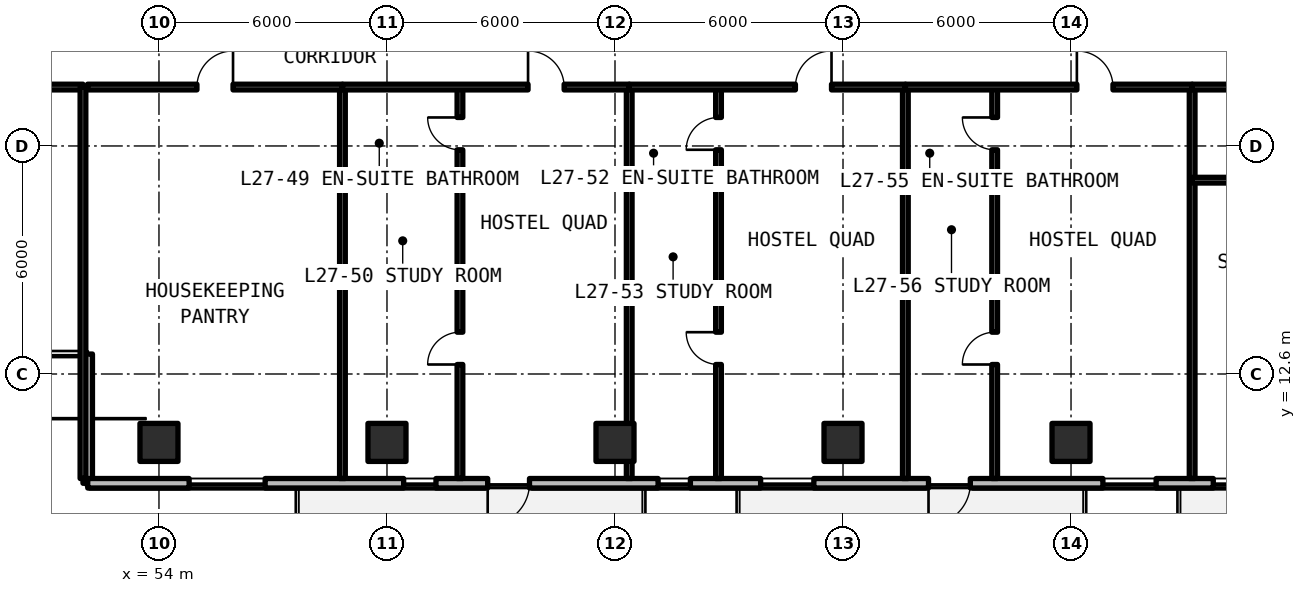
"""IFC4 building model, lengths in metres.
Left out: names, types, materials, properties, quantities, classifications, styles, units other than length and angle.
Written with IfcOpenShell. Run it as: python <this file> out.ifc"""

import sys

from ifc_helpers import new_model, si_unit, direction, frame, frame_2d, origin, origin_2d, place, context, subcontext, project, spatial, rectangle, extrude, element, fill, save


model = new_model("IFC4")
c1 = context("Model", 3, precision=1e-05, world=origin(), true_north=direction((0.0, 1.0)))
c2 = subcontext(c1, "Body", "Model", "MODEL_VIEW")
j1 = project(units=[si_unit("LENGTHUNIT", "METRE"), si_unit("PLANEANGLEUNIT", "RADIAN")], contexts=[c1])
p1 = place(None, origin())
s1 = spatial("IfcSite", under=j1, at=p1, CompositionType="ELEMENT")
p2 = place(p1, origin())
s2 = spatial("IfcBuilding", under=s1, at=p2, CompositionType="ELEMENT")
p3 = place(p2, frame((0.0, 0.0, 98.67)))
s3 = spatial("IfcBuildingStorey", under=s2, at=p3, CompositionType="ELEMENT", Elevation=98.67)
for number, where, z_axis, x_axis in (
    (1, (54.0, 10.8, 0.0), (0.0, 0.0, 1.0), (1.0, 0.0, 0.0)),
    (2, (60.0, 10.8, 0.0), (0.0, 0.0, 1.0), (1.0, 0.0, 0.0)),
    (3, (66.0, 10.8, 0.0), (0.0, 0.0, 1.0), (1.0, 0.0, 0.0)),
    (4, (72.0, 10.8, 0.0), (0.0, 0.0, 1.0), (1.0, 0.0, 0.0)),
    (5, (78.0, 10.8, 0.0), (0.0, 0.0, 1.0), (1.0, 0.0, 0.0)),
):
    element("IfcColumn", number, at=place(p3, frame(where, z_axis=z_axis, x_axis=x_axis)), inside=s3, PredefinedType="COLUMN", context=c2, shape_type="SweptSolid", body=[
        extrude(rectangle(XDim=1.0, YDim=1.0, at=origin_2d()), origin(), (0.0, 0.0, 1.0), 3.3),
    ])
p4 = place(p3, frame((52.125, 13.125, 0.0), z_axis=(0.0, 0.0, 1.0), x_axis=(0.0, -1.0, 0.0)))
e6 = element("IfcWall", 6, at=p4, inside=s3, PredefinedType="SOLIDWALL", context=c2, shape_type="SweptSolid", body=[
    extrude(rectangle(XDim=3.4, YDim=0.25, at=frame_2d((1.7, 0.0))), origin(), (0.0, 0.0, 1.0), 3.08),
])
p5 = place(p3, frame((52.125, 9.725, 0.0), z_axis=(0.0, 0.0, 1.0), x_axis=(1.0, 0.0, 0.0)))
e7 = element("IfcWall", 7, at=p5, inside=s3, PredefinedType="SOLIDWALL", context=c2, shape_type="SweptSolid", body=[
    extrude(rectangle(XDim=44.023, YDim=0.25, at=frame_2d((22.012, 0.0))), origin(), (0.0, 0.0, 1.0), 3.08),
])
p6 = place(p5, frame((10.525, 0.0, 0.0)))
e8 = element("IfcOpeningElement", 8, at=p6, cuts=e7, PredefinedType="OPENING", context=c2, shape_type="SweptSolid", body=[
    extrude(rectangle(XDim=1.1, YDim=2.15, at=frame_2d((0.55, 1.075))), frame((0.0, 0.135, 0.0), z_axis=(0.0, -1.0, 0.0), x_axis=(1.0, 0.0, 0.0)), (0.0, 0.0, 1.0), 0.27),
])
p7 = place(p5, frame((22.125, 0.0, 0.0)))
e9 = element("IfcOpeningElement", 9, at=p7, cuts=e7, PredefinedType="OPENING", context=c2, shape_type="SweptSolid", body=[
    extrude(rectangle(XDim=1.1, YDim=2.15, at=frame_2d((0.55, 1.075))), frame((0.0, 0.135, 0.0), z_axis=(0.0, -1.0, 0.0), x_axis=(1.0, 0.0, 0.0)), (0.0, 0.0, 1.0), 0.27),
])
p8 = place(p5, frame((34.475, 0.0, 0.0)))
e10 = element("IfcOpeningElement", 10, at=p8, cuts=e7, PredefinedType="OPENING", context=c2, shape_type="SweptSolid", body=[
    extrude(rectangle(XDim=1.1, YDim=2.15, at=frame_2d((0.55, 1.075))), frame((0.0, 0.135, 0.0), z_axis=(0.0, -1.0, 0.0), x_axis=(1.0, 0.0, 0.0)), (0.0, 0.0, 1.0), 0.27),
])
p9 = place(p5, frame((2.669, 0.0, 0.78)))
e11 = element("IfcOpeningElement", 11, at=p9, cuts=e7, PredefinedType="OPENING", context=c2, shape_type="SweptSolid", body=[
    extrude(rectangle(XDim=2.0, YDim=1.66, at=frame_2d((1.0, 0.83))), frame((0.0, 0.135, 0.0), z_axis=(0.0, -1.0, 0.0), x_axis=(1.0, 0.0, 0.0)), (0.0, 0.0, 1.0), 0.27),
])
p10 = place(p5, frame((8.314, 0.0, 0.78)))
e12 = element("IfcOpeningElement", 12, at=p10, cuts=e7, PredefinedType="OPENING", context=c2, shape_type="SweptSolid", body=[
    extrude(rectangle(XDim=0.85, YDim=1.65, at=frame_2d((0.425, 0.825))), frame((0.0, 0.135, 0.0), z_axis=(0.0, -1.0, 0.0), x_axis=(1.0, 0.0, 0.0)), (0.0, 0.0, 1.0), 0.27),
])
p11 = place(p5, frame((15.009, 0.0, 0.78)))
e13 = element("IfcOpeningElement", 13, at=p11, cuts=e7, PredefinedType="OPENING", context=c2, shape_type="SweptSolid", body=[
    extrude(rectangle(XDim=0.85, YDim=1.65, at=frame_2d((0.425, 0.825))), frame((0.0, 0.135, 0.0), z_axis=(0.0, -1.0, 0.0), x_axis=(1.0, 0.0, 0.0)), (0.0, 0.0, 1.0), 0.27),
])
p12 = place(p5, frame((17.708, 0.0, 0.78)))
e14 = element("IfcOpeningElement", 14, at=p12, cuts=e7, PredefinedType="OPENING", context=c2, shape_type="SweptSolid", body=[
    extrude(rectangle(XDim=1.4, YDim=1.65, at=frame_2d((0.7, 0.825))), frame((0.0, 0.135, 0.0), z_axis=(0.0, -1.0, 0.0), x_axis=(1.0, 0.0, 0.0)), (0.0, 0.0, 1.0), 0.27),
])
p13 = place(p5, frame((26.714, 0.0, 0.78)))
e15 = element("IfcOpeningElement", 15, at=p13, cuts=e7, PredefinedType="OPENING", context=c2, shape_type="SweptSolid", body=[
    extrude(rectangle(XDim=1.4, YDim=1.65, at=frame_2d((0.7, 0.825))), frame((0.0, 0.135, 0.0), z_axis=(0.0, -1.0, 0.0), x_axis=(1.0, 0.0, 0.0)), (0.0, 0.0, 1.0), 0.27),
])
p14 = place(p5, frame((29.618, 0.0, 0.78)))
e16 = element("IfcOpeningElement", 16, at=p14, cuts=e7, PredefinedType="OPENING", context=c2, shape_type="SweptSolid", body=[
    extrude(rectangle(XDim=1.4, YDim=1.65, at=frame_2d((0.7, 0.825))), frame((0.0, 0.135, 0.0), z_axis=(0.0, -1.0, 0.0), x_axis=(1.0, 0.0, 0.0)), (0.0, 0.0, 1.0), 0.27),
])
p15 = place(p5, frame((39.102, 0.0, 0.78)))
e17 = element("IfcOpeningElement", 17, at=p15, cuts=e7, PredefinedType="OPENING", context=c2, shape_type="SweptSolid", body=[
    extrude(rectangle(XDim=2.0, YDim=1.66, at=frame_2d((1.0, 0.83))), frame((0.0, 0.135, 0.0), z_axis=(0.0, -1.0, 0.0), x_axis=(1.0, 0.0, 0.0)), (0.0, 0.0, 1.0), 0.27),
])
p16 = place(p3, frame((43.6, 20.15, 0.0), z_axis=(0.0, 0.0, 1.0), x_axis=(1.0, 0.0, 0.0)))
e18 = element("IfcWall", 18, at=p16, inside=s3, PredefinedType="SOLIDWALL", context=c2, shape_type="SweptSolid", body=[
    extrude(rectangle(XDim=8.4, YDim=0.15, at=frame_2d((4.2, 0.0))), origin(), (0.0, 0.0, 1.0), 2.35),
])
p17 = place(p16, frame((3.65, 0.0, 0.0)))
e19 = element("IfcOpeningElement", 19, at=p17, cuts=e18, PredefinedType="OPENING", context=c2, shape_type="SweptSolid", body=[
    extrude(rectangle(XDim=1.1, YDim=2.15, at=frame_2d((0.55, 1.075))), frame((0.0, 0.085, 0.0), z_axis=(0.0, -1.0, 0.0), x_axis=(1.0, 0.0, 0.0)), (0.0, 0.0, 1.0), 0.17),
])
for number, where, z_axis, x_axis in (
    (20, (52.0, 9.85, 0.0), (0.0, 0.0, 1.0), (0.0, 1.0, 0.0)),
    (21, (58.828, 9.85, 0.0), (0.0, 0.0, 1.0), (0.0, 1.0, 0.0)),
):
    element("IfcWall", number, at=place(p3, frame(where, z_axis=z_axis, x_axis=x_axis)), inside=s3, PredefinedType="SOLIDWALL", context=c2, shape_type="SweptSolid", body=[
        extrude(rectangle(XDim=10.3, YDim=0.15, at=frame_2d((5.15, 0.0))), origin(), (0.0, 0.0, 1.0), 2.35),
    ])
p18 = place(p3, frame((52.12, 20.15, 0.0), z_axis=(0.0, 0.0, 1.0), x_axis=(1.0, 0.0, 0.0)))
e22 = element("IfcWall", 22, at=p18, inside=s3, PredefinedType="SOLIDWALL", context=c2, shape_type="SweptSolid", body=[
    extrude(rectangle(XDim=6.708, YDim=0.15, at=frame_2d((3.354, 0.0))), origin(), (0.0, 0.0, 1.0), 2.35),
])
p19 = place(p18, frame((2.879, 0.0, 0.0)))
e23 = element("IfcOpeningElement", 23, at=p19, cuts=e22, PredefinedType="OPENING", context=c2, shape_type="SweptSolid", body=[
    extrude(rectangle(XDim=0.95, YDim=2.15, at=frame_2d((0.475, 1.075))), frame((0.0, 0.085, 0.0), z_axis=(0.0, -1.0, 0.0), x_axis=(1.0, 0.0, 0.0)), (0.0, 0.0, 1.0), 0.17),
])
p20 = place(p3, frame((66.374, 9.85, 0.0), z_axis=(0.0, 0.0, 1.0), x_axis=(0.0, 1.0, 0.0)))
e24 = element("IfcWall", 24, at=p20, inside=s3, PredefinedType="SOLIDWALL", context=c2, shape_type="SweptSolid", body=[
    extrude(rectangle(XDim=10.3, YDim=0.15, at=frame_2d((5.15, 0.0))), origin(), (0.0, 0.0, 1.0), 2.35),
])
p21 = place(p3, frame((58.828, 17.7, 0.0), z_axis=(0.0, 0.0, 1.0), x_axis=(1.0, 0.0, 0.0)))
e25 = element("IfcWall", 25, at=p21, inside=s3, PredefinedType="PARTITIONING", context=c2, shape_type="SweptSolid", body=[
    extrude(rectangle(XDim=3.092, YDim=0.15, at=frame_2d((1.546, 0.0))), origin(), (0.0, 0.0, 1.0), 2.35),
])
p22 = place(p3, frame((61.92, 9.85, 0.0), z_axis=(0.0, 0.0, 1.0), x_axis=(0.0, 1.0, 0.0)))
e26 = element("IfcWall", 26, at=p22, inside=s3, PredefinedType="PARTITIONING", context=c2, shape_type="SweptSolid", body=[
    extrude(rectangle(XDim=10.3, YDim=0.15, at=frame_2d((5.15, 0.0))), origin(), (0.0, 0.0, 1.0), 2.35),
])
p23 = place(p22, frame((3.0, 0.0, 0.0)))
e27 = element("IfcOpeningElement", 27, at=p23, cuts=e26, PredefinedType="OPENING", context=c2, shape_type="SweptSolid", body=[
    extrude(rectangle(XDim=0.85, YDim=2.1, at=frame_2d((0.425, 1.05))), frame((0.0, 0.085, 0.0), z_axis=(0.0, -1.0, 0.0), x_axis=(1.0, 0.0, 0.0)), (0.0, 0.0, 1.0), 0.17),
])
p24 = place(p22, frame((8.65, 0.0, 0.0)))
e28 = element("IfcOpeningElement", 28, at=p24, cuts=e26, PredefinedType="OPENING", context=c2, shape_type="SweptSolid", body=[
    extrude(rectangle(XDim=0.85, YDim=2.1, at=frame_2d((0.425, 1.05))), frame((0.0, 0.085, 0.0), z_axis=(0.0, -1.0, 0.0), x_axis=(1.0, 0.0, 0.0)), (0.0, 0.0, 1.0), 0.17),
])
p25 = place(p3, frame((58.828, 20.15, 0.0), z_axis=(0.0, 0.0, 1.0), x_axis=(1.0, 0.0, 0.0)))
e29 = element("IfcWall", 29, at=p25, inside=s3, PredefinedType="SOLIDWALL", context=c2, shape_type="SweptSolid", body=[
    extrude(rectangle(XDim=7.546, YDim=0.15, at=frame_2d((3.773, 0.0))), origin(), (0.0, 0.0, 1.0), 2.35),
])
p26 = place(p25, frame((4.884, 0.0, 0.0)))
e30 = element("IfcOpeningElement", 30, at=p26, cuts=e29, PredefinedType="OPENING", context=c2, shape_type="SweptSolid", body=[
    extrude(rectangle(XDim=0.95, YDim=2.15, at=frame_2d((0.475, 1.075))), frame((0.0, 0.085, 0.0), z_axis=(0.0, -1.0, 0.0), x_axis=(1.0, 0.0, 0.0)), (0.0, 0.0, 1.0), 0.17),
])
p27 = place(p3, frame((73.641, 9.85, 0.0), z_axis=(0.0, 0.0, 1.0), x_axis=(0.0, 1.0, 0.0)))
e31 = element("IfcWall", 31, at=p27, inside=s3, PredefinedType="SOLIDWALL", context=c2, shape_type="SweptSolid", body=[
    extrude(rectangle(XDim=10.3, YDim=0.15, at=frame_2d((5.15, 0.0))), origin(), (0.0, 0.0, 1.0), 2.35),
])
p28 = place(p3, frame((66.374, 17.7, 0.0), z_axis=(0.0, 0.0, 1.0), x_axis=(1.0, 0.0, 0.0)))
e32 = element("IfcWall", 32, at=p28, inside=s3, PredefinedType="PARTITIONING", context=c2, shape_type="SweptSolid", body=[
    extrude(rectangle(XDim=2.35, YDim=0.15, at=frame_2d((1.175, 0.0))), origin(), (0.0, 0.0, 1.0), 2.35),
])
p29 = place(p3, frame((68.724, 9.85, 0.0), z_axis=(0.0, 0.0, 1.0), x_axis=(0.0, 1.0, 0.0)))
e33 = element("IfcWall", 33, at=p29, inside=s3, PredefinedType="PARTITIONING", context=c2, shape_type="SweptSolid", body=[
    extrude(rectangle(XDim=10.3, YDim=0.15, at=frame_2d((5.15, 0.0))), origin(), (0.0, 0.0, 1.0), 2.35),
])
p30 = place(p29, frame((3.0, 0.0, 0.0)))
e34 = element("IfcOpeningElement", 34, at=p30, cuts=e33, PredefinedType="OPENING", context=c2, shape_type="SweptSolid", body=[
    extrude(rectangle(XDim=0.85, YDim=2.1, at=frame_2d((0.425, 1.05))), frame((0.0, 0.085, 0.0), z_axis=(0.0, -1.0, 0.0), x_axis=(1.0, 0.0, 0.0)), (0.0, 0.0, 1.0), 0.17),
])
p31 = place(p29, frame((8.65, 0.0, 0.0)))
e35 = element("IfcOpeningElement", 35, at=p31, cuts=e33, PredefinedType="OPENING", context=c2, shape_type="SweptSolid", body=[
    extrude(rectangle(XDim=0.85, YDim=2.1, at=frame_2d((0.425, 1.05))), frame((0.0, 0.085, 0.0), z_axis=(0.0, -1.0, 0.0), x_axis=(1.0, 0.0, 0.0)), (0.0, 0.0, 1.0), 0.17),
])
p32 = place(p3, frame((66.374, 20.15, 0.0), z_axis=(0.0, 0.0, 1.0), x_axis=(1.0, 0.0, 0.0)))
e36 = element("IfcWall", 36, at=p32, inside=s3, PredefinedType="SOLIDWALL", context=c2, shape_type="SweptSolid", body=[
    extrude(rectangle(XDim=7.267, YDim=0.15, at=frame_2d((3.633, 0.0))), origin(), (0.0, 0.0, 1.0), 2.35),
])
p33 = place(p32, frame((4.373, 0.0, 0.0)))
e37 = element("IfcOpeningElement", 37, at=p33, cuts=e36, PredefinedType="OPENING", context=c2, shape_type="SweptSolid", body=[
    extrude(rectangle(XDim=0.95, YDim=2.15, at=frame_2d((0.475, 1.075))), frame((0.0, 0.085, 0.0), z_axis=(0.0, -1.0, 0.0), x_axis=(1.0, 0.0, 0.0)), (0.0, 0.0, 1.0), 0.17),
])
p34 = place(p3, frame((81.187, 9.85, 0.0), z_axis=(0.0, 0.0, 1.0), x_axis=(0.0, 1.0, 0.0)))
e38 = element("IfcWall", 38, at=p34, inside=s3, PredefinedType="SOLIDWALL", context=c2, shape_type="SweptSolid", body=[
    extrude(rectangle(XDim=10.3, YDim=0.15, at=frame_2d((5.15, 0.0))), origin(), (0.0, 0.0, 1.0), 2.35),
])
p35 = place(p3, frame((73.641, 17.7, 0.0), z_axis=(0.0, 0.0, 1.0), x_axis=(1.0, 0.0, 0.0)))
e39 = element("IfcWall", 39, at=p35, inside=s3, PredefinedType="PARTITIONING", context=c2, shape_type="SweptSolid", body=[
    extrude(rectangle(XDim=2.35, YDim=0.15, at=frame_2d((1.175, 0.0))), origin(), (0.0, 0.0, 1.0), 2.35),
])
p36 = place(p3, frame((75.991, 9.85, 0.0), z_axis=(0.0, 0.0, 1.0), x_axis=(0.0, 1.0, 0.0)))
e40 = element("IfcWall", 40, at=p36, inside=s3, PredefinedType="PARTITIONING", context=c2, shape_type="SweptSolid", body=[
    extrude(rectangle(XDim=10.3, YDim=0.15, at=frame_2d((5.15, 0.0))), origin(), (0.0, 0.0, 1.0), 2.35),
])
p37 = place(p36, frame((3.0, 0.0, 0.0)))
e41 = element("IfcOpeningElement", 41, at=p37, cuts=e40, PredefinedType="OPENING", context=c2, shape_type="SweptSolid", body=[
    extrude(rectangle(XDim=0.85, YDim=2.1, at=frame_2d((0.425, 1.05))), frame((0.0, 0.085, 0.0), z_axis=(0.0, -1.0, 0.0), x_axis=(1.0, 0.0, 0.0)), (0.0, 0.0, 1.0), 0.17),
])
p38 = place(p36, frame((8.65, 0.0, 0.0)))
e42 = element("IfcOpeningElement", 42, at=p38, cuts=e40, PredefinedType="OPENING", context=c2, shape_type="SweptSolid", body=[
    extrude(rectangle(XDim=0.85, YDim=2.1, at=frame_2d((0.425, 1.05))), frame((0.0, 0.085, 0.0), z_axis=(0.0, -1.0, 0.0), x_axis=(1.0, 0.0, 0.0)), (0.0, 0.0, 1.0), 0.17),
])
p39 = place(p3, frame((73.641, 20.15, 0.0), z_axis=(0.0, 0.0, 1.0), x_axis=(1.0, 0.0, 0.0)))
e43 = element("IfcWall", 43, at=p39, inside=s3, PredefinedType="SOLIDWALL", context=c2, shape_type="SweptSolid", body=[
    extrude(rectangle(XDim=7.546, YDim=0.15, at=frame_2d((3.773, 0.0))), origin(), (0.0, 0.0, 1.0), 2.35),
])
p40 = place(p39, frame((4.513, 0.0, 0.0)))
e44 = element("IfcOpeningElement", 44, at=p40, cuts=e43, PredefinedType="OPENING", context=c2, shape_type="SweptSolid", body=[
    extrude(rectangle(XDim=0.95, YDim=2.15, at=frame_2d((0.475, 1.075))), frame((0.0, 0.085, 0.0), z_axis=(0.0, -1.0, 0.0), x_axis=(1.0, 0.0, 0.0)), (0.0, 0.0, 1.0), 0.17),
])
p41 = place(p3, frame((81.187, 17.7, 0.0), z_axis=(0.0, 0.0, 1.0), x_axis=(1.0, 0.0, 0.0)))
e45 = element("IfcWall", 45, at=p41, inside=s3, PredefinedType="PARTITIONING", context=c2, shape_type="SweptSolid", body=[
    extrude(rectangle(XDim=4.733, YDim=0.15, at=frame_2d((2.366, 0.0))), origin(), (0.0, 0.0, 1.0), 2.35),
])
p42 = place(p3, frame((81.187, 20.15, 0.0), z_axis=(0.0, 0.0, 1.0), x_axis=(1.0, 0.0, 0.0)))
e46 = element("IfcWall", 46, at=p42, inside=s3, PredefinedType="SOLIDWALL", context=c2, shape_type="SweptSolid", body=[
    extrude(rectangle(XDim=7.267, YDim=0.15, at=frame_2d((3.633, 0.0))), origin(), (0.0, 0.0, 1.0), 2.35),
])
p43 = place(p42, frame((5.565, 0.0, 0.0)))
e47 = element("IfcOpeningElement", 47, at=p43, cuts=e46, PredefinedType="OPENING", context=c2, shape_type="SweptSolid", body=[
    extrude(rectangle(XDim=0.95, YDim=2.15, at=frame_2d((0.475, 1.075))), frame((0.0, 0.085, 0.0), z_axis=(0.0, -1.0, 0.0), x_axis=(1.0, 0.0, 0.0)), (0.0, 0.0, 1.0), 0.17),
])
p44 = place(p6, frame((1.1, 0.0, 0.0), z_axis=(0.0, 0.0, 1.0), x_axis=(-1.0, 0.0, 0.0)))
e48 = element("IfcDoor", 48, at=p44, inside=s3, OperationType="SINGLE_SWING_LEFT", PredefinedType="DOOR", context=c2, shape_type="SweptSolid", body=[
    extrude(rectangle(XDim=1.1, YDim=2.15, at=frame_2d((0.55, 1.075))), frame((0.0, 0.025, 0.0), z_axis=(0.0, -1.0, 0.0), x_axis=(1.0, 0.0, 0.0)), (0.0, 0.0, 1.0), 0.05),
])
fill(e8, e48)
p45 = place(p7, frame((1.1, 0.0, 0.0), z_axis=(0.0, 0.0, 1.0), x_axis=(-1.0, 0.0, 0.0)))
e49 = element("IfcDoor", 49, at=p45, inside=s3, OperationType="SINGLE_SWING_RIGHT", PredefinedType="DOOR", context=c2, shape_type="SweptSolid", body=[
    extrude(rectangle(XDim=1.1, YDim=2.15, at=frame_2d((0.55, 1.075))), frame((0.0, 0.025, 0.0), z_axis=(0.0, -1.0, 0.0), x_axis=(1.0, 0.0, 0.0)), (0.0, 0.0, 1.0), 0.05),
])
fill(e9, e49)
p46 = place(p9, origin())
e50 = element("IfcWindow", 50, at=p46, inside=s3, PartitioningType="SINGLE_PANEL", PredefinedType="WINDOW", context=c2, shape_type="SweptSolid", body=[
    extrude(rectangle(XDim=2.0, YDim=1.66, at=frame_2d((1.0, 0.83))), frame((0.0, 0.03, 0.0), z_axis=(0.0, -1.0, 0.0), x_axis=(1.0, 0.0, 0.0)), (0.0, 0.0, 1.0), 0.06),
])
fill(e11, e50)
p47 = place(p10, origin())
e51 = element("IfcWindow", 51, at=p47, inside=s3, PartitioningType="SINGLE_PANEL", PredefinedType="WINDOW", context=c2, shape_type="SweptSolid", body=[
    extrude(rectangle(XDim=0.85, YDim=1.65, at=frame_2d((0.425, 0.825))), frame((0.0, 0.03, 0.0), z_axis=(0.0, -1.0, 0.0), x_axis=(1.0, 0.0, 0.0)), (0.0, 0.0, 1.0), 0.06),
])
fill(e12, e51)
p48 = place(p11, origin())
e52 = element("IfcWindow", 52, at=p48, inside=s3, PartitioningType="SINGLE_PANEL", PredefinedType="WINDOW", context=c2, shape_type="SweptSolid", body=[
    extrude(rectangle(XDim=0.85, YDim=1.65, at=frame_2d((0.425, 0.825))), frame((0.0, 0.03, 0.0), z_axis=(0.0, -1.0, 0.0), x_axis=(1.0, 0.0, 0.0)), (0.0, 0.0, 1.0), 0.06),
])
fill(e13, e52)
p49 = place(p12, origin())
e53 = element("IfcWindow", 53, at=p49, inside=s3, PartitioningType="SINGLE_PANEL", PredefinedType="WINDOW", context=c2, shape_type="SweptSolid", body=[
    extrude(rectangle(XDim=1.4, YDim=1.65, at=frame_2d((0.7, 0.825))), frame((0.0, 0.03, 0.0), z_axis=(0.0, -1.0, 0.0), x_axis=(1.0, 0.0, 0.0)), (0.0, 0.0, 1.0), 0.06),
])
fill(e14, e53)
p50 = place(p13, origin())
e54 = element("IfcWindow", 54, at=p50, inside=s3, PartitioningType="SINGLE_PANEL", PredefinedType="WINDOW", context=c2, shape_type="SweptSolid", body=[
    extrude(rectangle(XDim=1.4, YDim=1.65, at=frame_2d((0.7, 0.825))), frame((0.0, 0.03, 0.0), z_axis=(0.0, -1.0, 0.0), x_axis=(1.0, 0.0, 0.0)), (0.0, 0.0, 1.0), 0.06),
])
fill(e15, e54)
p51 = place(p14, origin())
e55 = element("IfcWindow", 55, at=p51, inside=s3, PartitioningType="SINGLE_PANEL", PredefinedType="WINDOW", context=c2, shape_type="SweptSolid", body=[
    extrude(rectangle(XDim=1.4, YDim=1.65, at=frame_2d((0.7, 0.825))), frame((0.0, 0.03, 0.0), z_axis=(0.0, -1.0, 0.0), x_axis=(1.0, 0.0, 0.0)), (0.0, 0.0, 1.0), 0.06),
])
fill(e16, e55)
p52 = place(p19, origin())
e56 = element("IfcDoor", 56, at=p52, inside=s3, OperationType="SINGLE_SWING_RIGHT", PredefinedType="DOOR", context=c2, shape_type="SweptSolid", body=[
    extrude(rectangle(XDim=0.95, YDim=2.15, at=frame_2d((0.475, 1.075))), frame((0.0, 0.025, 0.0), z_axis=(0.0, -1.0, 0.0), x_axis=(1.0, 0.0, 0.0)), (0.0, 0.0, 1.0), 0.05),
])
fill(e23, e56)
p53 = place(p23, origin())
e57 = element("IfcDoor", 57, at=p53, inside=s3, OperationType="SINGLE_SWING_LEFT", PredefinedType="DOOR", context=c2, shape_type="SweptSolid", body=[
    extrude(rectangle(XDim=0.85, YDim=2.1, at=frame_2d((0.425, 1.05))), frame((0.0, 0.025, 0.0), z_axis=(0.0, -1.0, 0.0), x_axis=(1.0, 0.0, 0.0)), (0.0, 0.0, 1.0), 0.05),
])
fill(e27, e57)
p54 = place(p24, origin())
e58 = element("IfcDoor", 58, at=p54, inside=s3, OperationType="SINGLE_SWING_RIGHT", PredefinedType="DOOR", context=c2, shape_type="SweptSolid", body=[
    extrude(rectangle(XDim=0.85, YDim=2.1, at=frame_2d((0.425, 1.05))), frame((0.0, 0.025, 0.0), z_axis=(0.0, -1.0, 0.0), x_axis=(1.0, 0.0, 0.0)), (0.0, 0.0, 1.0), 0.05),
])
fill(e28, e58)
p55 = place(p26, origin())
e59 = element("IfcDoor", 59, at=p55, inside=s3, OperationType="SINGLE_SWING_LEFT", PredefinedType="DOOR", context=c2, shape_type="SweptSolid", body=[
    extrude(rectangle(XDim=0.95, YDim=2.15, at=frame_2d((0.475, 1.075))), frame((0.0, 0.025, 0.0), z_axis=(0.0, -1.0, 0.0), x_axis=(1.0, 0.0, 0.0)), (0.0, 0.0, 1.0), 0.05),
])
fill(e30, e59)
p56 = place(p30, origin())
e60 = element("IfcDoor", 60, at=p56, inside=s3, OperationType="SINGLE_SWING_RIGHT", PredefinedType="DOOR", context=c2, shape_type="SweptSolid", body=[
    extrude(rectangle(XDim=0.85, YDim=2.1, at=frame_2d((0.425, 1.05))), frame((0.0, 0.025, 0.0), z_axis=(0.0, -1.0, 0.0), x_axis=(1.0, 0.0, 0.0)), (0.0, 0.0, 1.0), 0.05),
])
fill(e34, e60)
p57 = place(p31, origin())
e61 = element("IfcDoor", 61, at=p57, inside=s3, OperationType="SINGLE_SWING_LEFT", PredefinedType="DOOR", context=c2, shape_type="SweptSolid", body=[
    extrude(rectangle(XDim=0.85, YDim=2.1, at=frame_2d((0.425, 1.05))), frame((0.0, 0.025, 0.0), z_axis=(0.0, -1.0, 0.0), x_axis=(1.0, 0.0, 0.0)), (0.0, 0.0, 1.0), 0.05),
])
fill(e35, e61)
p58 = place(p33, origin())
e62 = element("IfcDoor", 62, at=p58, inside=s3, OperationType="SINGLE_SWING_RIGHT", PredefinedType="DOOR", context=c2, shape_type="SweptSolid", body=[
    extrude(rectangle(XDim=0.95, YDim=2.15, at=frame_2d((0.475, 1.075))), frame((0.0, 0.025, 0.0), z_axis=(0.0, -1.0, 0.0), x_axis=(1.0, 0.0, 0.0)), (0.0, 0.0, 1.0), 0.05),
])
fill(e37, e62)
p59 = place(p37, origin())
e63 = element("IfcDoor", 63, at=p59, inside=s3, OperationType="SINGLE_SWING_LEFT", PredefinedType="DOOR", context=c2, shape_type="SweptSolid", body=[
    extrude(rectangle(XDim=0.85, YDim=2.1, at=frame_2d((0.425, 1.05))), frame((0.0, 0.025, 0.0), z_axis=(0.0, -1.0, 0.0), x_axis=(1.0, 0.0, 0.0)), (0.0, 0.0, 1.0), 0.05),
])
fill(e41, e63)
p60 = place(p38, origin())
e64 = element("IfcDoor", 64, at=p60, inside=s3, OperationType="SINGLE_SWING_RIGHT", PredefinedType="DOOR", context=c2, shape_type="SweptSolid", body=[
    extrude(rectangle(XDim=0.85, YDim=2.1, at=frame_2d((0.425, 1.05))), frame((0.0, 0.025, 0.0), z_axis=(0.0, -1.0, 0.0), x_axis=(1.0, 0.0, 0.0)), (0.0, 0.0, 1.0), 0.05),
])
fill(e42, e64)
p61 = place(p40, origin())
e65 = element("IfcDoor", 65, at=p61, inside=s3, OperationType="SINGLE_SWING_LEFT", PredefinedType="DOOR", context=c2, shape_type="SweptSolid", body=[
    extrude(rectangle(XDim=0.95, YDim=2.15, at=frame_2d((0.475, 1.075))), frame((0.0, 0.025, 0.0), z_axis=(0.0, -1.0, 0.0), x_axis=(1.0, 0.0, 0.0)), (0.0, 0.0, 1.0), 0.05),
])
fill(e44, e65)
save(model, sys.argv[1])
